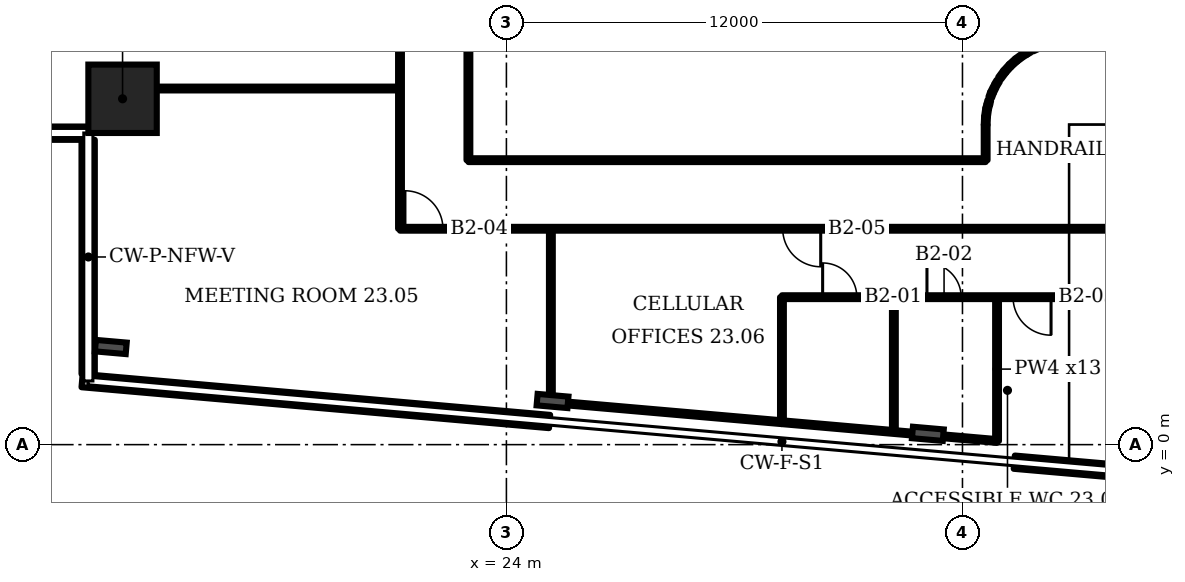
"""IFC4 building model, lengths in metres.
Left out: names, types, materials, properties, quantities, classifications, styles, units other than length and angle.
Written with IfcOpenShell. Run it as: python <this file> out.ifc"""

import sys

from ifc_helpers import new_model, si_unit, direction, frame, frame_2d, origin, origin_2d, place, context, subcontext, project, spatial, rectangle, i_section, extrude, element, fill, save


model = new_model("IFC4")
c1 = context("Model", 3, precision=1e-05, world=origin(), true_north=direction((0.0, 1.0)))
c2 = subcontext(c1, "Body", "Model", "MODEL_VIEW")
j1 = project(units=[si_unit("LENGTHUNIT", "METRE"), si_unit("PLANEANGLEUNIT", "RADIAN")], contexts=[c1])
p1 = place(None, origin())
s1 = spatial("IfcSite", under=j1, at=p1, CompositionType="ELEMENT")
p2 = place(p1, origin())
s2 = spatial("IfcBuilding", under=s1, at=p2, CompositionType="ELEMENT")
p3 = place(p2, frame((0.0, 0.0, 103.9)))
s3 = spatial("IfcBuildingStorey", under=s2, at=p3, CompositionType="ELEMENT", Elevation=103.9)
p4 = place(p3, frame((13.9, 9.1, 0.0), z_axis=(0.0, 0.0, 1.0), x_axis=(1.0, 0.0, 0.0)))
e1 = element("IfcColumn", 1, at=p4, inside=s3, PredefinedType="COLUMN", context=c2, shape_type="SweptSolid", body=[
    extrude(rectangle(XDim=1.8, YDim=1.8, at=origin_2d()), origin(), (0.0, 0.0, 1.0), 3.6),
])
for number, where, z_axis, x_axis in (
    (2, (13.591, 2.569, 0.0), (0.0, 0.0, 1.0), (-0.087, -0.996, 0.0)),
    (3, (25.214, 1.149, 0.0), (0.0, 0.0, 1.0), (-0.087, -0.996, 0.0)),
    (4, (35.089, 0.285, 0.0), (0.0, 0.0, 1.0), (-0.087, -0.996, 0.0)),
):
    element("IfcColumn", number, at=place(p3, frame(where, z_axis=z_axis, x_axis=x_axis)), inside=s3, PredefinedType="COLUMN", context=c2, shape_type="SweptSolid", body=[
        extrude(i_section(OverallWidth=0.303, OverallDepth=0.814, WebThickness=0.021, FlangeThickness=0.04, FilletRadius=0.03, at=origin_2d()), origin(), (0.0, 0.0, 1.0), 3.6),
    ])
p5 = place(p3, frame((12.835, 1.685, 0.0), z_axis=(0.0, 0.0, 1.0), x_axis=(0.996192, -0.087173, 0.0)))
e5 = element("IfcWall", 5, at=p5, inside=s3, PredefinedType="SOLIDWALL", context=c2, shape_type="SweptSolid", body=[
    extrude(rectangle(XDim=12.348, YDim=0.35, at=frame_2d((6.174, 0.0))), origin(), (0.0, 0.0, 1.0), 1.0),
])
p6 = place(p3, frame((37.363, -0.461, 0.0), z_axis=(0.0, 0.0, 1.0), x_axis=(0.996194, -0.087159, 0.0)))
e6 = element("IfcWall", 6, at=p6, inside=s3, PredefinedType="SOLIDWALL", context=c2, shape_type="SweptSolid", body=[
    extrude(rectangle(XDim=12.199, YDim=0.35, at=frame_2d((6.099, 0.0))), origin(), (0.0, 0.0, 1.0), 1.0),
])
p7 = place(p3, frame((9.036, 8.195, 0.0), z_axis=(0.0, 0.0, 1.0), x_axis=(1.0, 0.0, 0.0)))
e7 = element("IfcWall", 7, at=p7, inside=s3, PredefinedType="SOLIDWALL", context=c2, shape_type="SweptSolid", body=[
    extrude(rectangle(XDim=3.964, YDim=0.35, at=frame_2d((1.982, 0.0))), origin(), (0.0, 0.0, 1.0), 1.0),
])
p8 = place(p3, frame((12.995, 8.02, 0.0), z_axis=(0.0, 0.0, 1.0), x_axis=(0.0, -1.0, 0.0)))
e8 = element("IfcWall", 8, at=p8, inside=s3, PredefinedType="SOLIDWALL", context=c2, shape_type="SweptSolid", body=[
    extrude(rectangle(XDim=6.161, YDim=0.35, at=frame_2d((3.081, 0.0))), origin(), (0.0, 0.0, 1.0), 1.0),
])
p9 = place(p3, frame((14.81, 9.37, 0.0), z_axis=(0.0, 0.0, 1.0), x_axis=(1.0, 0.0, 0.0)))
e9 = element("IfcWall", 9, at=p9, inside=s3, PredefinedType="PARTITIONING", context=c2, shape_type="SweptSolid", body=[
    extrude(rectangle(XDim=6.39, YDim=0.1, at=frame_2d((3.195, 0.0))), origin(), (0.0, 0.0, 1.0), 3.2),
])
p10 = place(p3, frame((21.2, 5.68, 0.0), z_axis=(0.0, 0.0, 1.0), x_axis=(0.0, 1.0, 0.0)))
e10 = element("IfcWall", 10, at=p10, inside=s3, PredefinedType="PARTITIONING", context=c2, shape_type="SweptSolid", body=[
    extrude(rectangle(XDim=15.87, YDim=0.1, at=frame_2d((7.935, 0.0))), origin(), (0.0, 0.0, 1.0), 3.2),
])
p11 = place(p10, frame((11.85, 0.0, 0.0)))
e11 = element("IfcOpeningElement", 11, at=p11, cuts=e10, PredefinedType="OPENING", context=c2, shape_type="SweptSolid", body=[
    extrude(rectangle(XDim=1.0, YDim=2.1, at=frame_2d((0.5, 1.05))), frame((0.0, 0.06, 0.0), z_axis=(0.0, -1.0, 0.0), x_axis=(1.0, 0.0, 0.0)), (0.0, 0.0, 1.0), 0.12),
])
p12 = place(p3, frame((21.2, 5.68, 0.0), z_axis=(0.0, 0.0, 1.0), x_axis=(1.0, 0.0, 0.0)))
e12 = element("IfcWall", 12, at=p12, inside=s3, PredefinedType="PARTITIONING", context=c2, shape_type="SweptSolid", body=[
    extrude(rectangle(XDim=19.985, YDim=0.1, at=frame_2d((9.993, 0.0))), origin(), (0.0, 0.0, 1.0), 3.2),
])
p13 = place(p12, frame((0.13, 0.0, 0.0)))
e13 = element("IfcOpeningElement", 13, at=p13, cuts=e12, PredefinedType="OPENING", context=c2, shape_type="SweptSolid", body=[
    extrude(rectangle(XDim=1.0, YDim=2.1, at=frame_2d((0.5, 1.05))), frame((0.0, 0.06, 0.0), z_axis=(0.0, -1.0, 0.0), x_axis=(1.0, 0.0, 0.0)), (0.0, 0.0, 1.0), 0.12),
])
p14 = place(p12, frame((10.07, 0.0, 0.0)))
e14 = element("IfcOpeningElement", 14, at=p14, cuts=e12, PredefinedType="OPENING", context=c2, shape_type="SweptSolid", body=[
    extrude(rectangle(XDim=1.0, YDim=2.1, at=frame_2d((0.5, 1.05))), frame((0.0, 0.06, 0.0), z_axis=(0.0, -1.0, 0.0), x_axis=(1.0, 0.0, 0.0)), (0.0, 0.0, 1.0), 0.12),
])
p15 = place(p3, frame((23.0, 7.485, 0.0), z_axis=(0.0, 0.0, 1.0), x_axis=(0.0, 1.0, 0.0)))
e15 = element("IfcWall", 15, at=p15, inside=s3, PredefinedType="PARTITIONING", context=c2, shape_type="SweptSolid", body=[
    extrude(rectangle(XDim=18.015, YDim=0.1, at=frame_2d((9.007, 0.0))), origin(), (0.0, 0.0, 1.0), 3.2),
])
p16 = place(p15, frame((13.029, 0.0, 0.0)))
e16 = element("IfcOpeningElement", 16, at=p16, cuts=e15, PredefinedType="OPENING", context=c2, shape_type="SweptSolid", body=[
    extrude(rectangle(XDim=1.8, YDim=2.1, at=frame_2d((0.9, 1.05))), frame((0.0, 0.06, 0.0), z_axis=(0.0, -1.0, 0.0), x_axis=(1.0, 0.0, 0.0)), (0.0, 0.0, 1.0), 0.12),
])
p17 = place(p3, frame((23.0, 7.485, 0.0), z_axis=(0.0, 0.0, 1.0), x_axis=(1.0, 0.0, 0.0)))
e17 = element("IfcWall", 17, at=p17, inside=s3, PredefinedType="PARTITIONING", context=c2, shape_type="SweptSolid", body=[
    extrude(rectangle(XDim=13.61, YDim=0.1, at=frame_2d((6.805, 0.0))), origin(), (0.0, 0.0, 1.0), 3.2),
])
p18 = place(p3, frame((25.17, 1.12, 0.0), z_axis=(0.0, 0.0, 1.0), x_axis=(0.0, 1.0, 0.0)))
e18 = element("IfcWall", 18, at=p18, inside=s3, PredefinedType="PARTITIONING", context=c2, shape_type="SweptSolid", body=[
    extrude(rectangle(XDim=4.56, YDim=0.1, at=frame_2d((2.28, 0.0))), origin(), (0.0, 0.0, 1.0), 3.2),
])
p19 = place(p3, frame((31.25, 0.59, 0.0), z_axis=(0.0, 0.0, 1.0), x_axis=(-0.996218, 0.086845, 0.0)))
e19 = element("IfcWall", 19, at=p19, inside=s3, PredefinedType="PARTITIONING", context=c2, shape_type="SweptSolid", body=[
    extrude(rectangle(XDim=6.103, YDim=0.1, at=frame_2d((3.052, 0.0))), origin(), (0.0, 0.0, 1.0), 2.58),
])
p20 = place(p3, frame((31.25, 0.59, 0.0), z_axis=(0.0, 0.0, 1.0), x_axis=(0.0, 1.0, 0.0)))
e20 = element("IfcWall", 20, at=p20, inside=s3, PredefinedType="PARTITIONING", context=c2, shape_type="SweptSolid", body=[
    extrude(rectangle(XDim=3.29, YDim=0.1, at=frame_2d((1.645, 0.0))), origin(), (0.0, 0.0, 1.0), 3.2),
])
p21 = place(p3, frame((31.25, 3.88, 0.0), z_axis=(0.0, 0.0, 1.0), x_axis=(1.0, 0.0, 0.0)))
e21 = element("IfcWall", 21, at=p21, inside=s3, PredefinedType="PARTITIONING", context=c2, shape_type="SweptSolid", body=[
    extrude(rectangle(XDim=9.935, YDim=0.1, at=frame_2d((4.968, 0.0))), origin(), (0.0, 0.0, 1.0), 3.2),
])
p22 = place(p21, frame((1.071, 0.0, 0.0)))
e22 = element("IfcOpeningElement", 22, at=p22, cuts=e21, PredefinedType="OPENING", context=c2, shape_type="SweptSolid", body=[
    extrude(rectangle(XDim=0.9, YDim=2.1, at=frame_2d((0.45, 1.05))), frame((0.0, 0.06, 0.0), z_axis=(0.0, -1.0, 0.0), x_axis=(1.0, 0.0, 0.0)), (0.0, 0.0, 1.0), 0.12),
])
p23 = place(p21, frame((3.816, 0.0, 0.0)))
e23 = element("IfcOpeningElement", 23, at=p23, cuts=e21, PredefinedType="OPENING", context=c2, shape_type="SweptSolid", body=[
    extrude(rectangle(XDim=0.9, YDim=2.1, at=frame_2d((0.45, 1.05))), frame((0.0, 0.06, 0.0), z_axis=(0.0, -1.0, 0.0), x_axis=(1.0, 0.0, 0.0)), (0.0, 0.0, 1.0), 0.12),
])
p24 = place(p21, frame((6.081, 0.0, 0.0)))
e24 = element("IfcOpeningElement", 24, at=p24, cuts=e21, PredefinedType="OPENING", context=c2, shape_type="SweptSolid", body=[
    extrude(rectangle(XDim=1.0, YDim=2.1, at=frame_2d((0.5, 1.05))), frame((0.0, 0.06, 0.0), z_axis=(0.0, -1.0, 0.0), x_axis=(1.0, 0.0, 0.0)), (0.0, 0.0, 1.0), 0.12),
])
p25 = place(p3, frame((34.195, 0.33, 0.0), z_axis=(0.0, 0.0, 1.0), x_axis=(0.0, 1.0, 0.0)))
e25 = element("IfcWall", 25, at=p25, inside=s3, PredefinedType="PARTITIONING", context=c2, shape_type="SweptSolid", body=[
    extrude(rectangle(XDim=3.55, YDim=0.1, at=frame_2d((1.775, 0.0))), origin(), (0.0, 0.0, 1.0), 3.2),
])
p26 = place(p3, frame((36.61, 7.485, 0.0), z_axis=(0.0, 0.0, 1.0), x_axis=(0.0, 1.0, 0.0)))
e26 = element("IfcWall", 26, at=p26, inside=s3, PredefinedType="PARTITIONING", context=c2, shape_type="SweptSolid", body=[
    extrude(rectangle(XDim=0.93, YDim=0.1, at=frame_2d((0.465, 0.0))), origin(), (0.0, 0.0, 1.0), 3.2),
])
p27 = place(p3, frame((36.61, 8.415, 0.0), z_axis=(0.0, 0.0, 1.0), x_axis=(0.045458, 0.998967, 0.0)))
e27 = element("IfcWall", 27, at=p27, inside=s3, PredefinedType="PARTITIONING", context=c2, shape_type="SweptSolid", body=[
    extrude(rectangle(XDim=0.22, YDim=0.1, at=frame_2d((0.11, 0.0))), origin(), (0.0, 0.0, 1.0), 3.2),
])
p28 = place(p3, frame((36.62, 8.635, 0.0), z_axis=(0.0, 0.0, 1.0), x_axis=(0.140454, 0.990086, 0.0)))
e28 = element("IfcWall", 28, at=p28, inside=s3, PredefinedType="PARTITIONING", context=c2, shape_type="SweptSolid", body=[
    extrude(rectangle(XDim=0.212, YDim=0.1, at=frame_2d((0.106, 0.0))), origin(), (0.0, 0.0, 1.0), 3.2),
])
p29 = place(p3, frame((36.65, 8.845, 0.0), z_axis=(0.0, 0.0, 1.0), x_axis=(0.275016, 0.961438, 0.0)))
e29 = element("IfcWall", 29, at=p29, inside=s3, PredefinedType="PARTITIONING", context=c2, shape_type="SweptSolid", body=[
    extrude(rectangle(XDim=0.109, YDim=0.1, at=frame_2d((0.055, 0.0))), origin(), (0.0, 0.0, 1.0), 3.2),
])
p30 = place(p3, frame((36.68, 8.95, 0.0), z_axis=(0.0, 0.0, 1.0), x_axis=(0.232946, 0.972493, 0.0)))
e30 = element("IfcWall", 30, at=p30, inside=s3, PredefinedType="PARTITIONING", context=c2, shape_type="SweptSolid", body=[
    extrude(rectangle(XDim=0.108, YDim=0.1, at=frame_2d((0.054, 0.0))), origin(), (0.0, 0.0, 1.0), 3.2),
])
p31 = place(p3, frame((36.73, 9.135, 0.0), z_axis=(0.0, 0.0, 1.0), x_axis=(0.3382, 0.941078, 0.0)))
e31 = element("IfcWall", 31, at=p31, inside=s3, PredefinedType="PARTITIONING", context=c2, shape_type="SweptSolid", body=[
    extrude(rectangle(XDim=0.133, YDim=0.1, at=frame_2d((0.066, 0.0))), origin(), (0.0, 0.0, 1.0), 3.2),
])
p32 = place(p3, frame((36.775, 9.26, 0.0), z_axis=(0.0, 0.0, 1.0), x_axis=(0.44838, 0.893848, 0.0)))
e32 = element("IfcWall", 32, at=p32, inside=s3, PredefinedType="PARTITIONING", context=c2, shape_type="SweptSolid", body=[
    extrude(rectangle(XDim=0.168, YDim=0.1, at=frame_2d((0.084, 0.0))), origin(), (0.0, 0.0, 1.0), 3.2),
])
p33 = place(p3, frame((36.87, 9.455, 0.0), z_axis=(0.0, 0.0, 1.0), x_axis=(0.519025, 0.854758, 0.0)))
e33 = element("IfcWall", 33, at=p33, inside=s3, PredefinedType="PARTITIONING", context=c2, shape_type="SweptSolid", body=[
    extrude(rectangle(XDim=0.135, YDim=0.1, at=frame_2d((0.067, 0.0))), origin(), (0.0, 0.0, 1.0), 3.2),
])
p34 = place(p3, frame((36.91, 0.095, 0.0), z_axis=(0.0, 0.0, 1.0), x_axis=(0.0, 1.0, 0.0)))
e34 = element("IfcWall", 34, at=p34, inside=s3, PredefinedType="PARTITIONING", context=c2, shape_type="SweptSolid", body=[
    extrude(rectangle(XDim=3.785, YDim=0.1, at=frame_2d((1.893, 0.0))), origin(), (0.0, 0.0, 1.0), 3.2),
])
p35 = place(p3, frame((36.91, 0.095, 0.0), z_axis=(0.0, 0.0, 1.0), x_axis=(-0.996195, 0.087145, 0.0)))
e35 = element("IfcWall", 35, at=p35, inside=s3, PredefinedType="PARTITIONING", context=c2, shape_type="SweptSolid", body=[
    extrude(rectangle(XDim=5.682, YDim=0.1, at=frame_2d((2.841, 0.0))), origin(), (0.0, 0.0, 1.0), 2.58),
])
p36 = place(p3, frame((36.98, 9.64, 0.0), z_axis=(0.0, 0.0, 1.0), x_axis=(0.596595, 0.802549, 0.0)))
e36 = element("IfcWall", 36, at=p36, inside=s3, PredefinedType="PARTITIONING", context=c2, shape_type="SweptSolid", body=[
    extrude(rectangle(XDim=0.218, YDim=0.1, at=frame_2d((0.109, 0.0))), origin(), (0.0, 0.0, 1.0), 3.2),
])
p37 = place(p3, frame((37.11, 9.815, 0.0), z_axis=(0.0, 0.0, 1.0), x_axis=(0.670589, 0.741832, 0.0)))
e37 = element("IfcWall", 37, at=p37, inside=s3, PredefinedType="PARTITIONING", context=c2, shape_type="SweptSolid", body=[
    extrude(rectangle(XDim=0.216, YDim=0.1, at=frame_2d((0.108, 0.0))), origin(), (0.0, 0.0, 1.0), 3.2),
])
p38 = place(p3, frame((37.255, 9.975, 0.0), z_axis=(0.0, 0.0, 1.0), x_axis=(0.741269, 0.67121, 0.0)))
e38 = element("IfcWall", 38, at=p38, inside=s3, PredefinedType="PARTITIONING", context=c2, shape_type="SweptSolid", body=[
    extrude(rectangle(XDim=0.216, YDim=0.1, at=frame_2d((0.108, 0.0))), origin(), (0.0, 0.0, 1.0), 3.2),
])
p39 = place(p3, frame((37.415, 10.12, 0.0), z_axis=(0.0, 0.0, 1.0), x_axis=(0.803993, 0.594635, 0.0)))
e39 = element("IfcWall", 39, at=p39, inside=s3, PredefinedType="PARTITIONING", context=c2, shape_type="SweptSolid", body=[
    extrude(rectangle(XDim=0.168, YDim=0.1, at=frame_2d((0.084, 0.0))), origin(), (0.0, 0.0, 1.0), 3.2),
])
p40 = place(p3, frame((37.585, 10.245, 0.0), z_axis=(0.0, 0.0, 1.0), x_axis=(0.846156, 0.532926, 0.0)))
e40 = element("IfcWall", 40, at=p40, inside=s3, PredefinedType="PARTITIONING", context=c2, shape_type="SweptSolid", body=[
    extrude(rectangle(XDim=0.112, YDim=0.1, at=frame_2d((0.056, 0.0))), origin(), (0.0, 0.0, 1.0), 3.2),
])
p41 = place(p3, frame((37.68, 10.305, 0.0), z_axis=(0.0, 0.0, 1.0), x_axis=(0.864661, 0.502348, 0.0)))
e41 = element("IfcWall", 41, at=p41, inside=s3, PredefinedType="PARTITIONING", context=c2, shape_type="SweptSolid", body=[
    extrude(rectangle(XDim=0.11, YDim=0.1, at=frame_2d((0.055, 0.0))), origin(), (0.0, 0.0, 1.0), 3.2),
])
p42 = place(p22, origin())
e42 = element("IfcDoor", 42, at=p42, inside=s3, OperationType="SINGLE_SWING_LEFT", PredefinedType="DOOR", context=c2, shape_type="SweptSolid", body=[
    extrude(rectangle(XDim=0.9, YDim=2.1, at=frame_2d((0.45, 1.05))), frame((0.0, 0.025, 0.0), z_axis=(0.0, -1.0, 0.0), x_axis=(1.0, 0.0, 0.0)), (0.0, 0.0, 1.0), 0.05),
])
fill(e22, e42)
p43 = place(p23, origin())
e43 = element("IfcDoor", 43, at=p43, inside=s3, OperationType="SINGLE_SWING_LEFT", PredefinedType="DOOR", context=c2, shape_type="SweptSolid", body=[
    extrude(rectangle(XDim=0.9, YDim=2.1, at=frame_2d((0.45, 1.05))), frame((0.0, 0.025, 0.0), z_axis=(0.0, -1.0, 0.0), x_axis=(1.0, 0.0, 0.0)), (0.0, 0.0, 1.0), 0.05),
])
fill(e23, e43)
p44 = place(p24, origin())
e44 = element("IfcDoor", 44, at=p44, inside=s3, OperationType="SINGLE_SWING_RIGHT", PredefinedType="DOOR", context=c2, shape_type="SweptSolid", body=[
    extrude(rectangle(XDim=1.0, YDim=2.1, at=frame_2d((0.5, 1.05))), frame((0.0, 0.025, 0.0), z_axis=(0.0, -1.0, 0.0), x_axis=(1.0, 0.0, 0.0)), (0.0, 0.0, 1.0), 0.05),
])
fill(e24, e44)
p45 = place(p13, origin())
e45 = element("IfcDoor", 45, at=p45, inside=s3, OperationType="SINGLE_SWING_LEFT", PredefinedType="DOOR", context=c2, shape_type="SweptSolid", body=[
    extrude(rectangle(XDim=1.0, YDim=2.1, at=frame_2d((0.5, 1.05))), frame((0.0, 0.025, 0.0), z_axis=(0.0, -1.0, 0.0), x_axis=(1.0, 0.0, 0.0)), (0.0, 0.0, 1.0), 0.05),
])
fill(e13, e45)
p46 = place(p14, origin())
e46 = element("IfcDoor", 46, at=p46, inside=s3, OperationType="SINGLE_SWING_RIGHT", PredefinedType="DOOR", context=c2, shape_type="SweptSolid", body=[
    extrude(rectangle(XDim=1.0, YDim=2.1, at=frame_2d((0.5, 1.05))), frame((0.0, 0.025, 0.0), z_axis=(0.0, -1.0, 0.0), x_axis=(1.0, 0.0, 0.0)), (0.0, 0.0, 1.0), 0.05),
])
fill(e14, e46)
save(model, sys.argv[1])
